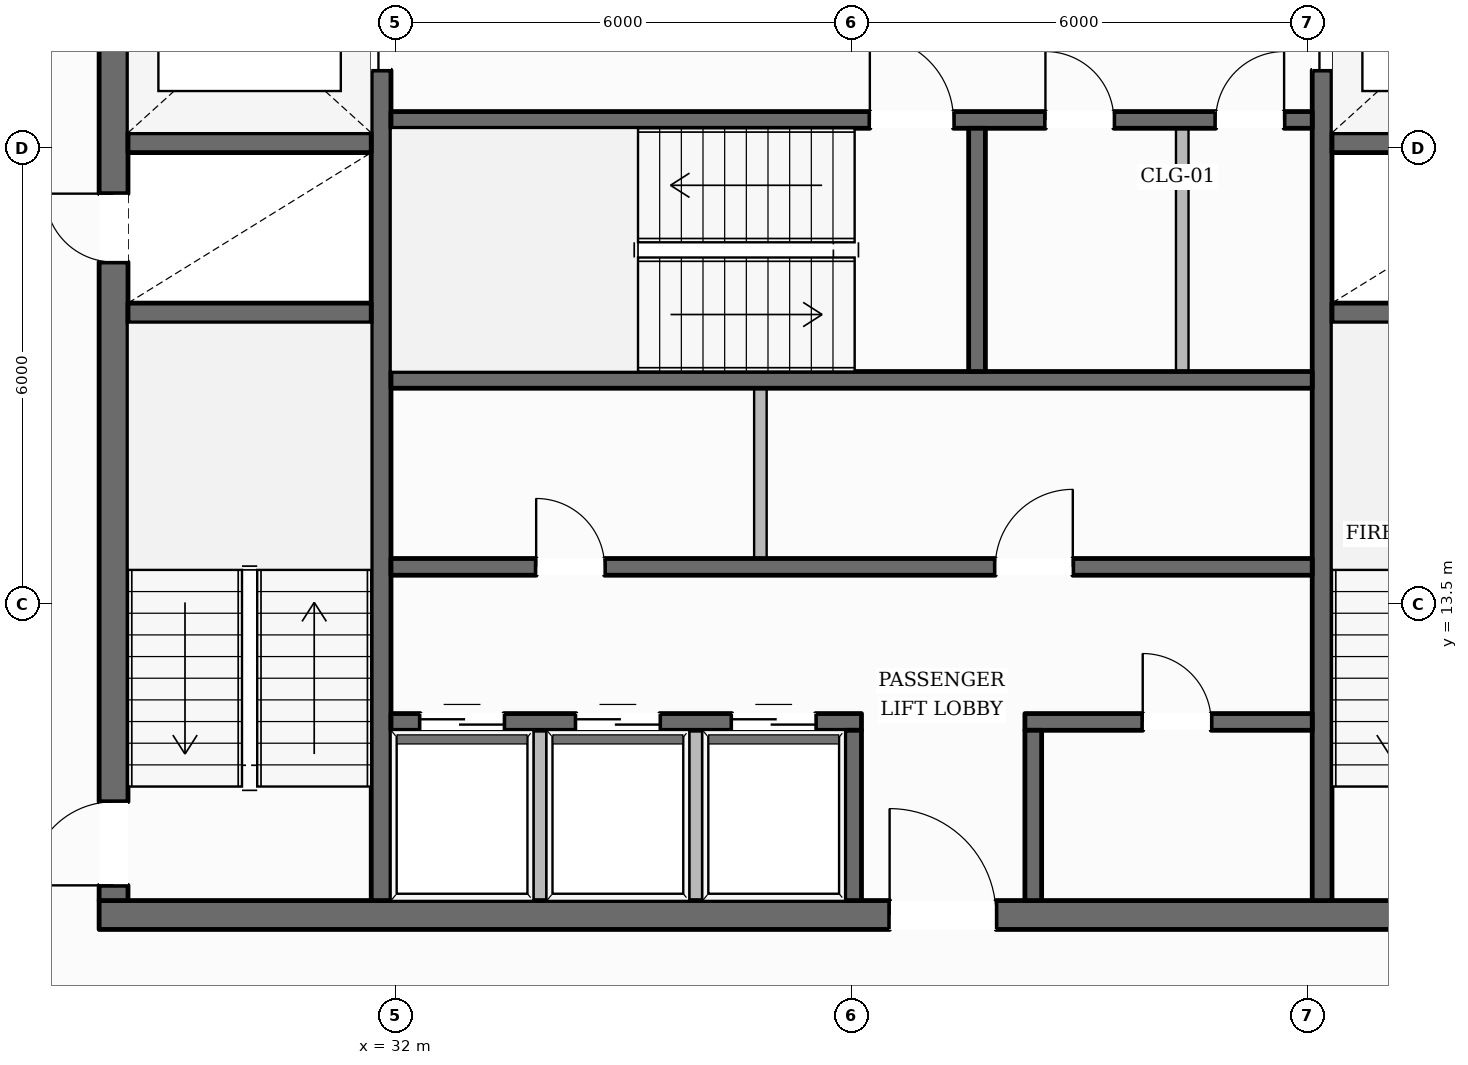
"""IFC4 building model, lengths in metres.
Left out: names, types, materials, properties, quantities, classifications, styles, units other than length and angle.
Written with IfcOpenShell. Run it as: python <this file> out.ifc"""

import sys

from ifc_helpers import new_model, si_unit, direction, frame, frame_2d, origin, place, context, subcontext, project, spatial, rectangle, extrude, element, fill, save


model = new_model("IFC4")
c1 = context("Model", 3, precision=1e-05, world=origin(), true_north=direction((0.0, 1.0)))
c2 = subcontext(c1, "Body", "Model", "MODEL_VIEW")
j1 = project(units=[si_unit("LENGTHUNIT", "METRE"), si_unit("PLANEANGLEUNIT", "RADIAN")], contexts=[c1])
p1 = place(None, origin())
s1 = spatial("IfcSite", under=j1, at=p1, CompositionType="ELEMENT")
p2 = place(p1, origin())
s2 = spatial("IfcBuilding", under=s1, at=p2, CompositionType="ELEMENT")
p3 = place(p2, frame((0.0, 0.0, 262.6)))
s3 = spatial("IfcBuildingStorey", under=s2, at=p3, CompositionType="ELEMENT", Elevation=262.6)
p4 = place(p3, frame((28.1, 9.41, 0.0), z_axis=(0.0, 0.0, 1.0), x_axis=(1.0, 0.0, 0.0)))
e1 = element("IfcWall", 1, at=p4, inside=s3, PredefinedType="SOLIDWALL", context=c2, shape_type="SweptSolid", body=[
    extrude(rectangle(XDim=19.8, YDim=0.38, at=frame_2d((9.9, 0.0))), origin(), (0.0, 0.0, 1.0), 3.61),
])
p5 = place(p4, frame((10.4, 0.0, 0.0)))
e2 = element("IfcOpeningElement", 2, at=p5, cuts=e1, PredefinedType="OPENING", context=c2, shape_type="SweptSolid", body=[
    extrude(rectangle(XDim=1.4, YDim=2.2, at=frame_2d((0.7, 1.1))), frame((0.0, 0.2, 0.0), z_axis=(0.0, -1.0, 0.0), x_axis=(1.0, 0.0, 0.0)), (0.0, 0.0, 1.0), 0.4),
])
p6 = place(p3, frame((28.29, 9.6, 0.0), z_axis=(0.0, 0.0, 1.0), x_axis=(0.0, 1.0, 0.0)))
e3 = element("IfcWall", 3, at=p6, inside=s3, PredefinedType="SOLIDWALL", context=c2, shape_type="SweptSolid", body=[
    extrude(rectangle(XDim=13.0, YDim=0.38, at=frame_2d((6.5, 0.0))), origin(), (0.0, 0.0, 1.0), 3.61),
])
p7 = place(p6, frame((0.2, 0.0, 0.0)))
e4 = element("IfcOpeningElement", 4, at=p7, cuts=e3, PredefinedType="OPENING", context=c2, shape_type="SweptSolid", body=[
    extrude(rectangle(XDim=1.1, YDim=2.15, at=frame_2d((0.55, 1.075))), frame((0.0, 0.2, 0.0), z_axis=(0.0, -1.0, 0.0), x_axis=(1.0, 0.0, 0.0)), (0.0, 0.0, 1.0), 0.4),
])
p8 = place(p6, frame((8.4, 0.0, 0.0)))
e5 = element("IfcOpeningElement", 5, at=p8, cuts=e3, PredefinedType="OPENING", context=c2, shape_type="SweptSolid", body=[
    extrude(rectangle(XDim=0.9, YDim=2.1, at=frame_2d((0.45, 1.05))), frame((0.0, 0.2, 0.0), z_axis=(0.0, -1.0, 0.0), x_axis=(1.0, 0.0, 0.0)), (0.0, 0.0, 1.0), 0.4),
])
p9 = place(p3, frame((31.81, 9.6, 0.0), z_axis=(0.0, 0.0, 1.0), x_axis=(0.0, 1.0, 0.0)))
e6 = element("IfcWall", 6, at=p9, inside=s3, PredefinedType="SHEAR", context=c2, shape_type="SweptSolid", body=[
    extrude(rectangle(XDim=13.0, YDim=0.26, at=frame_2d((6.5, 0.0))), origin(), (0.0, 0.0, 1.0), 3.61),
])
p10 = place(p9, frame((10.925, 0.0, 0.0)))
e7 = element("IfcOpeningElement", 7, at=p10, cuts=e6, PredefinedType="OPENING", context=c2, shape_type="SweptSolid", body=[
    extrude(rectangle(XDim=1.25, YDim=2.25, at=frame_2d((0.625, 1.125))), frame((0.0, 0.14, 0.0), z_axis=(0.0, -1.0, 0.0), x_axis=(1.0, 0.0, 0.0)), (0.0, 0.0, 1.0), 0.28),
])
p11 = place(p3, frame((44.19, 9.6, 0.0), z_axis=(0.0, 0.0, 1.0), x_axis=(0.0, 1.0, 0.0)))
e8 = element("IfcWall", 8, at=p11, inside=s3, PredefinedType="SHEAR", context=c2, shape_type="SweptSolid", body=[
    extrude(rectangle(XDim=13.0, YDim=0.26, at=frame_2d((6.5, 0.0))), origin(), (0.0, 0.0, 1.0), 3.61),
])
p12 = place(p11, frame((10.925, 0.0, 0.0)))
e9 = element("IfcOpeningElement", 9, at=p12, cuts=e8, PredefinedType="OPENING", context=c2, shape_type="SweptSolid", body=[
    extrude(rectangle(XDim=1.25, YDim=2.25, at=frame_2d((0.625, 1.125))), frame((0.0, 0.14, 0.0), z_axis=(0.0, -1.0, 0.0), x_axis=(1.0, 0.0, 0.0)), (0.0, 0.0, 1.0), 0.28),
])
for number, where, z_axis, x_axis in (
    (10, (28.48, 17.33, 0.0), (0.0, 0.0, 1.0), (1.0, 0.0, 0.0)),
    (11, (28.48, 19.57, 0.0), (0.0, 0.0, 1.0), (1.0, 0.0, 0.0)),
    (12, (44.32, 17.33, 0.0), (0.0, 0.0, 1.0), (1.0, 0.0, 0.0)),
    (13, (44.32, 19.57, 0.0), (0.0, 0.0, 1.0), (1.0, 0.0, 0.0)),
):
    element("IfcWall", number, at=place(p3, frame(where, z_axis=z_axis, x_axis=x_axis)), inside=s3, PredefinedType="SHEAR", context=c2, shape_type="SweptSolid", body=[
        extrude(rectangle(XDim=3.2, YDim=0.26, at=frame_2d((1.6, 0.0))), origin(), (0.0, 0.0, 1.0), 3.61),
    ])
p13 = place(p3, frame((31.94, 19.87, 0.0), z_axis=(0.0, 0.0, 1.0), x_axis=(1.0, 0.0, 0.0)))
e14 = element("IfcWall", 14, at=p13, inside=s3, PredefinedType="SOLIDWALL", context=c2, shape_type="SweptSolid", body=[
    extrude(rectangle(XDim=12.12, YDim=0.22, at=frame_2d((6.06, 0.0))), origin(), (0.0, 0.0, 1.0), 3.61),
])
p14 = place(p13, frame((6.3, 0.0, 0.0)))
e15 = element("IfcOpeningElement", 15, at=p14, cuts=e14, PredefinedType="OPENING", context=c2, shape_type="SweptSolid", body=[
    extrude(rectangle(XDim=1.1, YDim=2.15, at=frame_2d((0.55, 1.075))), frame((0.0, 0.12, 0.0), z_axis=(0.0, -1.0, 0.0), x_axis=(1.0, 0.0, 0.0)), (0.0, 0.0, 1.0), 0.24),
])
p15 = place(p13, frame((8.61, 0.0, 0.0)))
e16 = element("IfcOpeningElement", 16, at=p15, cuts=e14, PredefinedType="OPENING", context=c2, shape_type="SweptSolid", body=[
    extrude(rectangle(XDim=0.9, YDim=2.1, at=frame_2d((0.45, 1.05))), frame((0.0, 0.12, 0.0), z_axis=(0.0, -1.0, 0.0), x_axis=(1.0, 0.0, 0.0)), (0.0, 0.0, 1.0), 0.24),
])
p16 = place(p13, frame((10.85, 0.0, 0.0)))
e17 = element("IfcOpeningElement", 17, at=p16, cuts=e14, PredefinedType="OPENING", context=c2, shape_type="SweptSolid", body=[
    extrude(rectangle(XDim=0.9, YDim=2.1, at=frame_2d((0.45, 1.05))), frame((0.0, 0.12, 0.0), z_axis=(0.0, -1.0, 0.0), x_axis=(1.0, 0.0, 0.0)), (0.0, 0.0, 1.0), 0.24),
])
p17 = place(p3, frame((31.94, 16.45, 0.0), z_axis=(0.0, 0.0, 1.0), x_axis=(1.0, 0.0, 0.0)))
e18 = element("IfcWall", 18, at=p17, inside=s3, PredefinedType="SOLIDWALL", context=c2, shape_type="SweptSolid", body=[
    extrude(rectangle(XDim=12.12, YDim=0.22, at=frame_2d((6.06, 0.0))), origin(), (0.0, 0.0, 1.0), 3.61),
])
p18 = place(p3, frame((39.65, 16.56, 0.0), z_axis=(0.0, 0.0, 1.0), x_axis=(0.0, 1.0, 0.0)))
e19 = element("IfcWall", 19, at=p18, inside=s3, PredefinedType="SOLIDWALL", context=c2, shape_type="SweptSolid", body=[
    extrude(rectangle(XDim=3.2, YDim=0.22, at=frame_2d((1.6, 0.0))), origin(), (0.0, 0.0, 1.0), 3.61),
])
p19 = place(p3, frame((31.94, 13.99, 0.0), z_axis=(0.0, 0.0, 1.0), x_axis=(1.0, 0.0, 0.0)))
e20 = element("IfcWall", 20, at=p19, inside=s3, PredefinedType="SOLIDWALL", context=c2, shape_type="SweptSolid", body=[
    extrude(rectangle(XDim=12.12, YDim=0.22, at=frame_2d((6.06, 0.0))), origin(), (0.0, 0.0, 1.0), 3.61),
])
p20 = place(p19, frame((1.91, 0.0, 0.0)))
e21 = element("IfcOpeningElement", 21, at=p20, cuts=e20, PredefinedType="OPENING", context=c2, shape_type="SweptSolid", body=[
    extrude(rectangle(XDim=0.9, YDim=2.1, at=frame_2d((0.45, 1.05))), frame((0.0, 0.12, 0.0), z_axis=(0.0, -1.0, 0.0), x_axis=(1.0, 0.0, 0.0)), (0.0, 0.0, 1.0), 0.24),
])
p21 = place(p19, frame((7.95, 0.0, 0.0)))
e22 = element("IfcOpeningElement", 22, at=p21, cuts=e20, PredefinedType="OPENING", context=c2, shape_type="SweptSolid", body=[
    extrude(rectangle(XDim=1.02, YDim=2.15, at=frame_2d((0.51, 1.075))), frame((0.0, 0.12, 0.0), z_axis=(0.0, -1.0, 0.0), x_axis=(1.0, 0.0, 0.0)), (0.0, 0.0, 1.0), 0.24),
])
p22 = place(p3, frame((31.94, 11.95, 0.0), z_axis=(0.0, 0.0, 1.0), x_axis=(1.0, 0.0, 0.0)))
e23 = element("IfcWall", 23, at=p22, inside=s3, PredefinedType="SOLIDWALL", context=c2, shape_type="SweptSolid", body=[
    extrude(rectangle(XDim=6.19, YDim=0.22, at=frame_2d((3.095, 0.0))), origin(), (0.0, 0.0, 1.0), 3.61),
])
p23 = place(p22, frame((0.385, 0.0, 0.0)))
e24 = element("IfcOpeningElement", 24, at=p23, cuts=e23, PredefinedType="OPENING", context=c2, shape_type="SweptSolid", body=[
    extrude(rectangle(XDim=1.1, YDim=2.2, at=frame_2d((0.55, 1.1))), frame((0.0, 0.12, 0.0), z_axis=(0.0, -1.0, 0.0), x_axis=(1.0, 0.0, 0.0)), (0.0, 0.0, 1.0), 0.24),
])
p24 = place(p22, frame((2.435, 0.0, 0.0)))
e25 = element("IfcOpeningElement", 25, at=p24, cuts=e23, PredefinedType="OPENING", context=c2, shape_type="SweptSolid", body=[
    extrude(rectangle(XDim=1.1, YDim=2.2, at=frame_2d((0.55, 1.1))), frame((0.0, 0.12, 0.0), z_axis=(0.0, -1.0, 0.0), x_axis=(1.0, 0.0, 0.0)), (0.0, 0.0, 1.0), 0.24),
])
p25 = place(p22, frame((4.485, 0.0, 0.0)))
e26 = element("IfcOpeningElement", 26, at=p25, cuts=e23, PredefinedType="OPENING", context=c2, shape_type="SweptSolid", body=[
    extrude(rectangle(XDim=1.1, YDim=2.2, at=frame_2d((0.55, 1.1))), frame((0.0, 0.12, 0.0), z_axis=(0.0, -1.0, 0.0), x_axis=(1.0, 0.0, 0.0)), (0.0, 0.0, 1.0), 0.24),
])
p26 = place(p3, frame((40.28, 11.95, 0.0), z_axis=(0.0, 0.0, 1.0), x_axis=(1.0, 0.0, 0.0)))
e27 = element("IfcWall", 27, at=p26, inside=s3, PredefinedType="SOLIDWALL", context=c2, shape_type="SweptSolid", body=[
    extrude(rectangle(XDim=3.78, YDim=0.22, at=frame_2d((1.89, 0.0))), origin(), (0.0, 0.0, 1.0), 3.61),
])
p27 = place(p26, frame((1.55, 0.0, 0.0)))
e28 = element("IfcOpeningElement", 28, at=p27, cuts=e27, PredefinedType="OPENING", context=c2, shape_type="SweptSolid", body=[
    extrude(rectangle(XDim=0.9, YDim=2.1, at=frame_2d((0.45, 1.05))), frame((0.0, 0.12, 0.0), z_axis=(0.0, -1.0, 0.0), x_axis=(1.0, 0.0, 0.0)), (0.0, 0.0, 1.0), 0.24),
])
for number, where, z_axis, x_axis in (
    (29, (38.02, 9.6, 0.0), (0.0, 0.0, 1.0), (0.0, 1.0, 0.0)),
    (30, (40.39, 9.6, 0.0), (0.0, 0.0, 1.0), (0.0, 1.0, 0.0)),
):
    element("IfcWall", number, at=place(p3, frame(where, z_axis=z_axis, x_axis=x_axis)), inside=s3, PredefinedType="SOLIDWALL", context=c2, shape_type="SweptSolid", body=[
        extrude(rectangle(XDim=2.24, YDim=0.22, at=frame_2d((1.12, 0.0))), origin(), (0.0, 0.0, 1.0), 3.61),
    ])
p28 = place(p3, frame((16.079, 10.951, 0.0), z_axis=(0.0, 0.0, 1.0), x_axis=(0.498709777088, 0.866769033963, 0.0)))
e31 = element("IfcWall", 31, at=p28, inside=s3, PredefinedType="STANDARD", context=c2, shape_type="SweptSolid", body=[
    extrude(rectangle(XDim=37.726, YDim=0.35, at=frame_2d((18.863, 0.0))), origin(), (0.0, 0.0, 1.0), 3.196),
])
p29 = place(p28, frame((9.031, 0.0, 0.0)))
e32 = element("IfcOpeningElement", 32, at=p29, cuts=e31, PredefinedType="OPENING", context=c2, shape_type="SweptSolid", body=[
    extrude(rectangle(XDim=1.0, YDim=2.2, at=frame_2d((0.5, 1.1))), frame((0.0, 0.185, 0.0), z_axis=(0.0, -1.0, 0.0), x_axis=(1.0, 0.0, 0.0)), (0.0, 0.0, 1.0), 0.37),
])
p30 = place(p28, frame((33.506, 0.0, 0.65)))
e33 = element("IfcOpeningElement", 33, at=p30, cuts=e31, PredefinedType="OPENING", context=c2, shape_type="SweptSolid", body=[
    extrude(rectangle(XDim=1.35, YDim=1.75, at=frame_2d((0.675, 0.875))), frame((0.0, 0.185, 0.0), z_axis=(0.0, -1.0, 0.0), x_axis=(1.0, 0.0, 0.0)), (0.0, 0.0, 1.0), 0.37),
])
p31 = place(p28, frame((27.379, 0.0, 0.65)))
e34 = element("IfcOpeningElement", 34, at=p31, cuts=e31, PredefinedType="OPENING", context=c2, shape_type="SweptSolid", body=[
    extrude(rectangle(XDim=1.35, YDim=1.75, at=frame_2d((0.675, 0.875))), frame((0.0, 0.185, 0.0), z_axis=(0.0, -1.0, 0.0), x_axis=(1.0, 0.0, 0.0)), (0.0, 0.0, 1.0), 0.37),
])
p32 = place(p28, frame((21.251, 0.0, 0.65)))
e35 = element("IfcOpeningElement", 35, at=p32, cuts=e31, PredefinedType="OPENING", context=c2, shape_type="SweptSolid", body=[
    extrude(rectangle(XDim=1.35, YDim=1.75, at=frame_2d((0.675, 0.875))), frame((0.0, 0.185, 0.0), z_axis=(0.0, -1.0, 0.0), x_axis=(1.0, 0.0, 0.0)), (0.0, 0.0, 1.0), 0.37),
])
p33 = place(p28, frame((2.868, 0.0, 0.65)))
e36 = element("IfcOpeningElement", 36, at=p33, cuts=e31, PredefinedType="OPENING", context=c2, shape_type="SweptSolid", body=[
    extrude(rectangle(XDim=1.35, YDim=1.75, at=frame_2d((0.675, 0.875))), frame((0.0, 0.185, 0.0), z_axis=(0.0, -1.0, 0.0), x_axis=(1.0, 0.0, 0.0)), (0.0, 0.0, 1.0), 0.37),
])
p34 = place(p3, frame((41.23, 43.577, 0.0), z_axis=(0.0, 0.0, 1.0), x_axis=(0.507689696002, -0.861540000565, 0.0)))
e37 = element("IfcWall", 37, at=p34, inside=s3, PredefinedType="STANDARD", context=c2, shape_type="SweptSolid", body=[
    extrude(rectangle(XDim=38.41, YDim=0.35, at=frame_2d((19.205, 0.0))), origin(), (0.0, 0.0, 1.0), 3.196),
])
p35 = place(p34, frame((34.134, 0.0, 0.65)))
e38 = element("IfcOpeningElement", 38, at=p35, cuts=e37, PredefinedType="OPENING", context=c2, shape_type="SweptSolid", body=[
    extrude(rectangle(XDim=1.35, YDim=1.75, at=frame_2d((0.675, 0.875))), frame((0.0, 0.185, 0.0), z_axis=(0.0, -1.0, 0.0), x_axis=(1.0, 0.0, 0.0)), (0.0, 0.0, 1.0), 0.37),
])
p36 = place(p34, frame((27.89, 0.0, 0.65)))
e39 = element("IfcOpeningElement", 39, at=p36, cuts=e37, PredefinedType="OPENING", context=c2, shape_type="SweptSolid", body=[
    extrude(rectangle(XDim=1.35, YDim=1.75, at=frame_2d((0.675, 0.875))), frame((0.0, 0.185, 0.0), z_axis=(0.0, -1.0, 0.0), x_axis=(1.0, 0.0, 0.0)), (0.0, 0.0, 1.0), 0.37),
])
p37 = place(p34, frame((21.647, 0.0, 0.65)))
e40 = element("IfcOpeningElement", 40, at=p37, cuts=e37, PredefinedType="OPENING", context=c2, shape_type="SweptSolid", body=[
    extrude(rectangle(XDim=1.35, YDim=1.75, at=frame_2d((0.675, 0.875))), frame((0.0, 0.185, 0.0), z_axis=(0.0, -1.0, 0.0), x_axis=(1.0, 0.0, 0.0)), (0.0, 0.0, 1.0), 0.37),
])
p38 = place(p34, frame((9.161, 0.0, 0.65)))
e41 = element("IfcOpeningElement", 41, at=p38, cuts=e37, PredefinedType="OPENING", context=c2, shape_type="SweptSolid", body=[
    extrude(rectangle(XDim=1.35, YDim=1.75, at=frame_2d((0.675, 0.875))), frame((0.0, 0.185, 0.0), z_axis=(0.0, -1.0, 0.0), x_axis=(1.0, 0.0, 0.0)), (0.0, 0.0, 1.0), 0.37),
])
p39 = place(p34, frame((2.917, 0.0, 0.65)))
e42 = element("IfcOpeningElement", 42, at=p39, cuts=e37, PredefinedType="OPENING", context=c2, shape_type="SweptSolid", body=[
    extrude(rectangle(XDim=1.35, YDim=1.75, at=frame_2d((0.675, 0.875))), frame((0.0, 0.185, 0.0), z_axis=(0.0, -1.0, 0.0), x_axis=(1.0, 0.0, 0.0)), (0.0, 0.0, 1.0), 0.37),
])
for number, where, z_axis, x_axis in (
    (43, (33.9, 9.49, 0.0), (0.0, 0.0, 1.0), (0.0, 1.0, 0.0)),
    (44, (35.95, 9.49, 0.0), (0.0, 0.0, 1.0), (0.0, 1.0, 0.0)),
):
    element("IfcWall", number, at=place(p3, frame(where, z_axis=z_axis, x_axis=x_axis)), inside=s3, PredefinedType="PARTITIONING", context=c2, shape_type="SweptSolid", body=[
        extrude(rectangle(XDim=2.35, YDim=0.165, at=frame_2d((1.175, 0.0))), origin(), (0.0, 0.0, 1.0), 3.61),
    ])
p40 = place(p3, frame((36.8, 14.1, 0.0), z_axis=(0.0, 0.0, 1.0), x_axis=(0.0, 1.0, 0.0)))
e45 = element("IfcWall", 45, at=p40, inside=s3, PredefinedType="PARTITIONING", context=c2, shape_type="SweptSolid", body=[
    extrude(rectangle(XDim=2.24, YDim=0.165, at=frame_2d((1.12, 0.0))), origin(), (0.0, 0.0, 1.0), 3.61),
])
p41 = place(p3, frame((42.35, 16.56, 0.0), z_axis=(0.0, 0.0, 1.0), x_axis=(0.0, 1.0, 0.0)))
e46 = element("IfcWall", 46, at=p41, inside=s3, PredefinedType="PARTITIONING", context=c2, shape_type="SweptSolid", body=[
    extrude(rectangle(XDim=3.2, YDim=0.165, at=frame_2d((1.6, 0.0))), origin(), (0.0, 0.0, 1.0), 3.61),
])
p42 = place(p7, origin())
e47 = element("IfcDoor", 47, at=p42, inside=s3, OperationType="SINGLE_SWING_LEFT", PredefinedType="DOOR", context=c2, shape_type="SweptSolid", body=[
    extrude(rectangle(XDim=1.1, YDim=2.15, at=frame_2d((0.55, 1.075))), frame((0.0, 0.025, 0.0), z_axis=(0.0, -1.0, 0.0), x_axis=(1.0, 0.0, 0.0)), (0.0, 0.0, 1.0), 0.05),
])
fill(e4, e47)
p43 = place(p14, origin())
e48 = element("IfcDoor", 48, at=p43, inside=s3, OperationType="SINGLE_SWING_LEFT", PredefinedType="DOOR", context=c2, shape_type="SweptSolid", body=[
    extrude(rectangle(XDim=1.1, YDim=2.15, at=frame_2d((0.55, 1.075))), frame((0.0, 0.025, 0.0), z_axis=(0.0, -1.0, 0.0), x_axis=(1.0, 0.0, 0.0)), (0.0, 0.0, 1.0), 0.05),
])
fill(e15, e48)
p44 = place(p8, origin())
e49 = element("IfcDoor", 49, at=p44, inside=s3, OperationType="SINGLE_SWING_RIGHT", PredefinedType="DOOR", context=c2, shape_type="SweptSolid", body=[
    extrude(rectangle(XDim=0.9, YDim=2.1, at=frame_2d((0.45, 1.05))), frame((0.0, 0.025, 0.0), z_axis=(0.0, -1.0, 0.0), x_axis=(1.0, 0.0, 0.0)), (0.0, 0.0, 1.0), 0.05),
])
fill(e5, e49)
p45 = place(p10, origin())
e50 = element("IfcDoor", 50, at=p45, inside=s3, OperationType="DOUBLE_DOOR_SLIDING", PredefinedType="DOOR", context=c2, shape_type="SweptSolid", body=[
    extrude(rectangle(XDim=1.25, YDim=2.25, at=frame_2d((0.625, 1.125))), frame((0.0, 0.025, 0.0), z_axis=(0.0, -1.0, 0.0), x_axis=(1.0, 0.0, 0.0)), (0.0, 0.0, 1.0), 0.05),
])
fill(e7, e50)
p46 = place(p12, origin())
e51 = element("IfcDoor", 51, at=p46, inside=s3, OperationType="DOUBLE_DOOR_SLIDING", PredefinedType="DOOR", context=c2, shape_type="SweptSolid", body=[
    extrude(rectangle(XDim=1.25, YDim=2.25, at=frame_2d((0.625, 1.125))), frame((0.0, 0.025, 0.0), z_axis=(0.0, -1.0, 0.0), x_axis=(1.0, 0.0, 0.0)), (0.0, 0.0, 1.0), 0.05),
])
fill(e9, e51)
p47 = place(p5, origin())
e52 = element("IfcDoor", 52, at=p47, inside=s3, OperationType="SINGLE_SWING_LEFT", PredefinedType="DOOR", context=c2, shape_type="SweptSolid", body=[
    extrude(rectangle(XDim=1.4, YDim=2.2, at=frame_2d((0.7, 1.1))), frame((0.0, 0.025, 0.0), z_axis=(0.0, -1.0, 0.0), x_axis=(1.0, 0.0, 0.0)), (0.0, 0.0, 1.0), 0.05),
])
fill(e2, e52)
p48 = place(p23, origin())
e53 = element("IfcDoor", 53, at=p48, inside=s3, OperationType="DOUBLE_DOOR_SLIDING", PredefinedType="DOOR", context=c2, shape_type="SweptSolid", body=[
    extrude(rectangle(XDim=1.1, YDim=2.2, at=frame_2d((0.55, 1.1))), frame((0.0, 0.025, 0.0), z_axis=(0.0, -1.0, 0.0), x_axis=(1.0, 0.0, 0.0)), (0.0, 0.0, 1.0), 0.05),
])
fill(e24, e53)
p49 = place(p24, origin())
e54 = element("IfcDoor", 54, at=p49, inside=s3, OperationType="DOUBLE_DOOR_SLIDING", PredefinedType="DOOR", context=c2, shape_type="SweptSolid", body=[
    extrude(rectangle(XDim=1.1, YDim=2.2, at=frame_2d((0.55, 1.1))), frame((0.0, 0.025, 0.0), z_axis=(0.0, -1.0, 0.0), x_axis=(1.0, 0.0, 0.0)), (0.0, 0.0, 1.0), 0.05),
])
fill(e25, e54)
p50 = place(p25, origin())
e55 = element("IfcDoor", 55, at=p50, inside=s3, OperationType="DOUBLE_DOOR_SLIDING", PredefinedType="DOOR", context=c2, shape_type="SweptSolid", body=[
    extrude(rectangle(XDim=1.1, YDim=2.2, at=frame_2d((0.55, 1.1))), frame((0.0, 0.025, 0.0), z_axis=(0.0, -1.0, 0.0), x_axis=(1.0, 0.0, 0.0)), (0.0, 0.0, 1.0), 0.05),
])
fill(e26, e55)
p51 = place(p20, origin())
e56 = element("IfcDoor", 56, at=p51, inside=s3, OperationType="SINGLE_SWING_LEFT", PredefinedType="DOOR", context=c2, shape_type="SweptSolid", body=[
    extrude(rectangle(XDim=0.9, YDim=2.1, at=frame_2d((0.45, 1.05))), frame((0.0, 0.025, 0.0), z_axis=(0.0, -1.0, 0.0), x_axis=(1.0, 0.0, 0.0)), (0.0, 0.0, 1.0), 0.05),
])
fill(e21, e56)
p52 = place(p21, origin())
e57 = element("IfcDoor", 57, at=p52, inside=s3, OperationType="SINGLE_SWING_RIGHT", PredefinedType="DOOR", context=c2, shape_type="SweptSolid", body=[
    extrude(rectangle(XDim=1.02, YDim=2.15, at=frame_2d((0.51, 1.075))), frame((0.0, 0.025, 0.0), z_axis=(0.0, -1.0, 0.0), x_axis=(1.0, 0.0, 0.0)), (0.0, 0.0, 1.0), 0.05),
])
fill(e22, e57)
p53 = place(p15, origin())
e58 = element("IfcDoor", 58, at=p53, inside=s3, OperationType="SINGLE_SWING_LEFT", PredefinedType="DOOR", context=c2, shape_type="SweptSolid", body=[
    extrude(rectangle(XDim=0.9, YDim=2.1, at=frame_2d((0.45, 1.05))), frame((0.0, 0.025, 0.0), z_axis=(0.0, -1.0, 0.0), x_axis=(1.0, 0.0, 0.0)), (0.0, 0.0, 1.0), 0.05),
])
fill(e16, e58)
p54 = place(p16, origin())
e59 = element("IfcDoor", 59, at=p54, inside=s3, OperationType="SINGLE_SWING_RIGHT", PredefinedType="DOOR", context=c2, shape_type="SweptSolid", body=[
    extrude(rectangle(XDim=0.9, YDim=2.1, at=frame_2d((0.45, 1.05))), frame((0.0, 0.025, 0.0), z_axis=(0.0, -1.0, 0.0), x_axis=(1.0, 0.0, 0.0)), (0.0, 0.0, 1.0), 0.05),
])
fill(e17, e59)
p55 = place(p27, origin())
e60 = element("IfcDoor", 60, at=p55, inside=s3, OperationType="SINGLE_SWING_LEFT", PredefinedType="DOOR", context=c2, shape_type="SweptSolid", body=[
    extrude(rectangle(XDim=0.9, YDim=2.1, at=frame_2d((0.45, 1.05))), frame((0.0, 0.025, 0.0), z_axis=(0.0, -1.0, 0.0), x_axis=(1.0, 0.0, 0.0)), (0.0, 0.0, 1.0), 0.05),
])
fill(e28, e60)
save(model, sys.argv[1])
